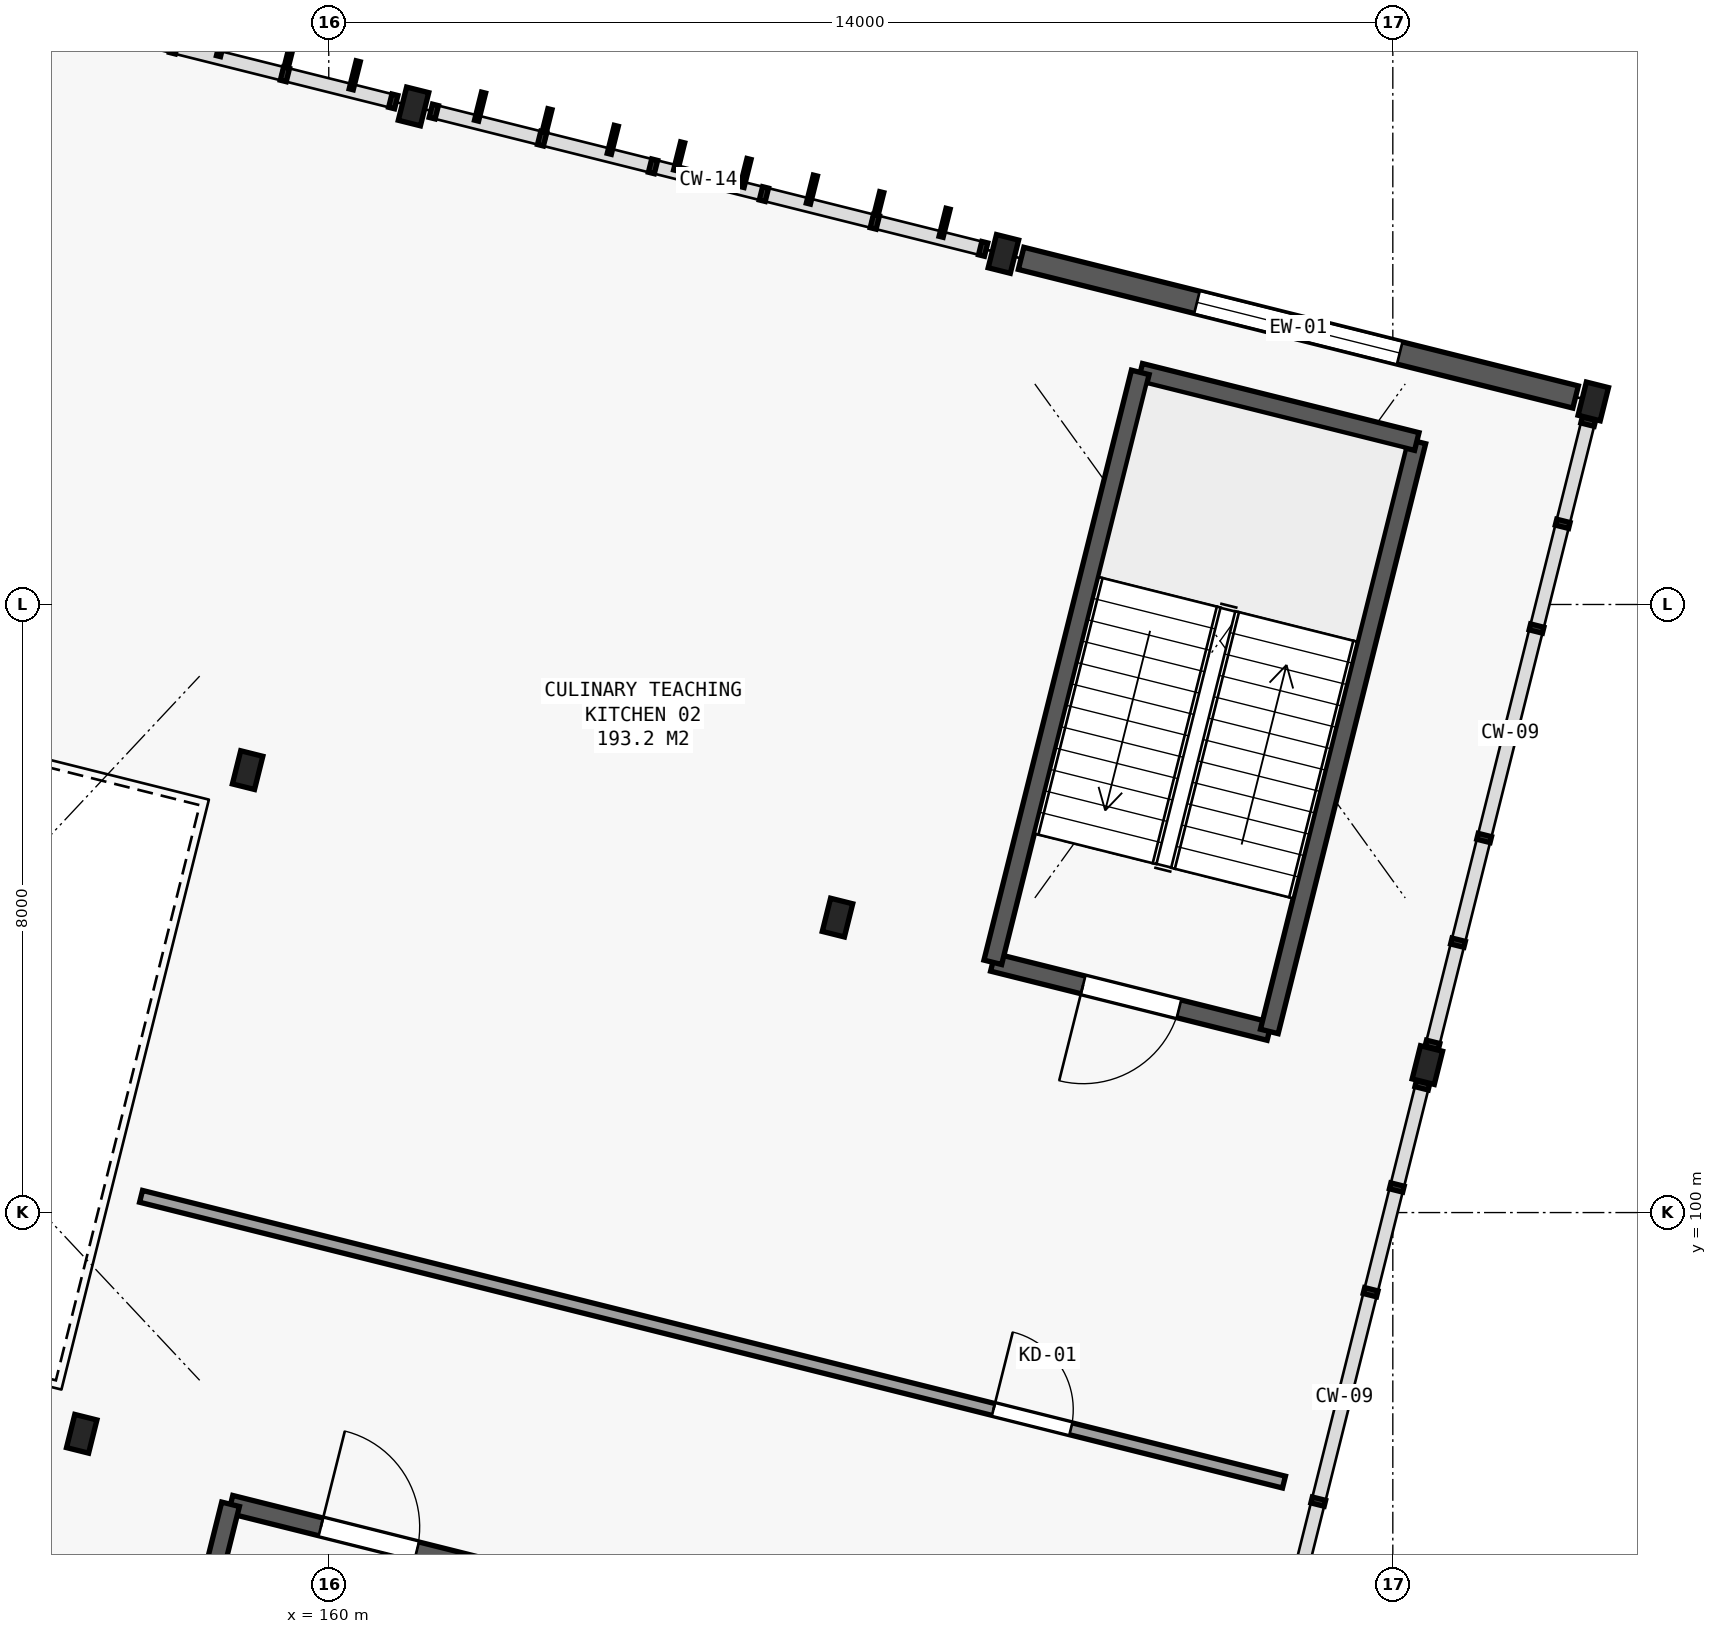
"""IFC4 building model, lengths in metres.
Left out: names, types, materials, properties, quantities, classifications, styles, units other than length and angle.
Written with IfcOpenShell. Run it as: python <this file> out.ifc"""

import sys

from ifc_helpers import new_model, si_unit, direction, frame, frame_2d, origin, origin_2d, place, context, subcontext, project, spatial, rectangle, i_section, extrude, element, fill, save


model = new_model("IFC4")
c1 = context("Model", 3, precision=1e-05, world=origin(), true_north=direction((0.0, 1.0)))
c2 = subcontext(c1, "Body", "Model", "MODEL_VIEW")
j1 = project(units=[si_unit("LENGTHUNIT", "METRE"), si_unit("PLANEANGLEUNIT", "RADIAN")], contexts=[c1])
p1 = place(None, origin())
s1 = spatial("IfcSite", under=j1, at=p1, CompositionType="ELEMENT")
p2 = place(p1, origin())
s2 = spatial("IfcBuilding", under=s1, at=p2, CompositionType="ELEMENT")
p3 = place(p2, frame((0.0, 0.0, 5.4)))
s3 = spatial("IfcBuildingStorey", under=s2, at=p3, CompositionType="ELEMENT", Elevation=5.4)
for number, where, z_axis, x_axis in (
    (1, (156.75, 97.09, 0.0), (0.0, 0.0, 1.0), (0.97, -0.243, 0.0)),
    (2, (158.932, 105.821, 0.0), (0.0, 0.0, 1.0), (0.97, -0.243, 0.0)),
    (3, (161.115, 114.552, 0.0), (0.0, 0.0, 1.0), (0.97, -0.243, 0.0)),
    (4, (166.694, 103.881, 0.0), (0.0, 0.0, 1.0), (0.97, -0.243, 0.0)),
    (5, (168.876, 112.612, 0.0), (0.0, 0.0, 1.0), (0.97, -0.243, 0.0)),
    (6, (174.455, 101.94, 0.0), (0.0, 0.0, 1.0), (0.97, -0.243, 0.0)),
    (7, (176.638, 110.672, 0.0), (0.0, 0.0, 1.0), (0.97, -0.243, 0.0)),
):
    element("IfcColumn", number, at=place(p3, frame(where, z_axis=z_axis, x_axis=x_axis)), inside=s3, PredefinedType="COLUMN", context=c2, shape_type="SweptSolid", body=[
        extrude(i_section(OverallWidth=0.3, OverallDepth=0.45, WebThickness=0.014, FlangeThickness=0.026, FilletRadius=0.027, at=origin_2d()), origin(), (0.0, 0.0, 1.0), 4.5),
    ])
p4 = place(p3, frame((169.109, 112.554, 0.0), z_axis=(0.0, 0.0, 1.0), x_axis=(0.970138680536, -0.242550902961, 0.0)))
e8 = element("IfcWall", 8, at=p4, inside=s3, PredefinedType="SHEAR", context=c2, shape_type="SweptSolid", body=[
    extrude(rectangle(XDim=7.52, YDim=0.3, at=frame_2d((3.76, 0.0))), origin(), (0.0, 0.0, 1.0), 4.22),
])
p5 = place(p4, frame((2.385, 0.0, 1.0)))
e9 = element("IfcOpeningElement", 9, at=p5, cuts=e8, PredefinedType="OPENING", context=c2, shape_type="SweptSolid", body=[
    extrude(rectangle(XDim=2.75, YDim=1.9, at=frame_2d((1.375, 0.95))), frame((0.0, 0.16, 0.0), z_axis=(0.0, -1.0, 0.0), x_axis=(1.0, 0.0, 0.0)), (0.0, 0.0, 1.0), 0.32),
])
p6 = place(p3, frame((158.708, 96.162, 0.0), z_axis=(0.0, 0.0, 1.0), x_axis=(0.970150158722, -0.242504988675, 0.0)))
e10 = element("IfcWall", 10, at=p6, inside=s3, PredefinedType="SOLIDWALL", context=c2, shape_type="SweptSolid", body=[
    extrude(rectangle(XDim=3.75, YDim=0.24, at=frame_2d((1.875, 0.0))), origin(), (0.0, 0.0, 1.0), 4.255),
])
p7 = place(p6, frame((1.225, 0.0, 0.0)))
e11 = element("IfcOpeningElement", 11, at=p7, cuts=e10, PredefinedType="OPENING", context=c2, shape_type="SweptSolid", body=[
    extrude(rectangle(XDim=1.3, YDim=2.15, at=frame_2d((0.65, 1.075))), frame((0.0, 0.13, 0.0), z_axis=(0.0, -1.0, 0.0), x_axis=(1.0, 0.0, 0.0)), (0.0, 0.0, 1.0), 0.26),
])
p8 = place(p3, frame((156.768, 88.401, 0.0), z_axis=(0.0, 0.0, 1.0), x_axis=(0.242521263911, 0.970146090314, 0.0)))
e12 = element("IfcWall", 12, at=p8, inside=s3, PredefinedType="SOLIDWALL", context=c2, shape_type="SweptSolid", body=[
    extrude(rectangle(XDim=8.0, YDim=0.24, at=frame_2d((4.0, 0.0))), origin(), (0.0, 0.0, 1.0), 4.255),
])
p9 = place(p3, frame((172.375, 102.383, 0.0), z_axis=(0.0, 0.0, 1.0), x_axis=(-0.970131009923, 0.242581581301, 0.0)))
e13 = element("IfcWall", 13, at=p9, inside=s3, PredefinedType="SOLIDWALL", context=c2, shape_type="SweptSolid", body=[
    extrude(rectangle(XDim=3.75, YDim=0.24, at=frame_2d((1.875, 0.0))), origin(), (0.0, 0.0, 1.0), 4.255),
])
p10 = place(p9, frame((1.225, 0.0, 0.0)))
e14 = element("IfcOpeningElement", 14, at=p10, cuts=e13, PredefinedType="OPENING", context=c2, shape_type="SweptSolid", body=[
    extrude(rectangle(XDim=1.3, YDim=2.15, at=frame_2d((0.65, 1.075))), frame((0.0, 0.13, 0.0), z_axis=(0.0, -1.0, 0.0), x_axis=(1.0, 0.0, 0.0)), (0.0, 0.0, 1.0), 0.26),
])
p11 = place(p3, frame((174.315, 110.144, 0.0), z_axis=(0.0, 0.0, 1.0), x_axis=(-0.242521263911, -0.970146090314, 0.0)))
e15 = element("IfcWall", 15, at=p11, inside=s3, PredefinedType="SOLIDWALL", context=c2, shape_type="SweptSolid", body=[
    extrude(rectangle(XDim=8.0, YDim=0.24, at=frame_2d((4.0, 0.0))), origin(), (0.0, 0.0, 1.0), 4.255),
])
p12 = place(p3, frame((170.677, 111.054, 0.0), z_axis=(0.0, 0.0, 1.0), x_axis=(0.970131009923, -0.242581581301, 0.0)))
e16 = element("IfcWall", 16, at=p12, inside=s3, PredefinedType="SOLIDWALL", context=c2, shape_type="SweptSolid", body=[
    extrude(rectangle(XDim=3.75, YDim=0.24, at=frame_2d((1.875, 0.0))), origin(), (0.0, 0.0, 1.0), 4.255),
])
p13 = place(p3, frame((168.737, 103.292, 0.0), z_axis=(0.0, 0.0, 1.0), x_axis=(0.242521263911, 0.970146090314, 0.0)))
e17 = element("IfcWall", 17, at=p13, inside=s3, PredefinedType="SOLIDWALL", context=c2, shape_type="SweptSolid", body=[
    extrude(rectangle(XDim=8.0, YDim=0.24, at=frame_2d((4.0, 0.0))), origin(), (0.0, 0.0, 1.0), 4.255),
])
p14 = place(p3, frame((157.531, 100.213, 0.0), z_axis=(0.0, 0.0, 1.0), x_axis=(0.97014342666, -0.242531918947, 0.0)))
e18 = element("IfcWall", 18, at=p14, inside=s3, PredefinedType="PARTITIONING", context=c2, shape_type="SweptSolid", body=[
    extrude(rectangle(XDim=15.5, YDim=0.16, at=frame_2d((7.75, 0.0))), origin(), (0.0, 0.0, 1.0), 3.64),
])
p15 = place(p14, frame((11.56, 0.0, 0.0)))
e19 = element("IfcOpeningElement", 19, at=p15, cuts=e18, PredefinedType="OPENING", context=c2, shape_type="SweptSolid", body=[
    extrude(rectangle(XDim=1.05, YDim=2.15, at=frame_2d((0.525, 1.075))), frame((0.0, 0.09, 0.0), z_axis=(0.0, -1.0, 0.0), x_axis=(1.0, 0.0, 0.0)), (0.0, 0.0, 1.0), 0.18),
])
p16 = place(p5, origin())
e20 = element("IfcWindow", 20, at=p16, inside=s3, PartitioningType="SINGLE_PANEL", PredefinedType="WINDOW", context=c2, shape_type="SweptSolid", body=[
    extrude(rectangle(XDim=2.75, YDim=1.9, at=frame_2d((1.375, 0.95))), frame((0.0, 0.03, 0.0), z_axis=(0.0, -1.0, 0.0), x_axis=(1.0, 0.0, 0.0)), (0.0, 0.0, 1.0), 0.06),
])
fill(e9, e20)
p17 = place(p7, origin())
e21 = element("IfcDoor", 21, at=p17, inside=s3, OperationType="SINGLE_SWING_LEFT", PredefinedType="DOOR", context=c2, shape_type="SweptSolid", body=[
    extrude(rectangle(XDim=1.3, YDim=2.15, at=frame_2d((0.65, 1.075))), frame((0.0, 0.025, 0.0), z_axis=(0.0, -1.0, 0.0), x_axis=(1.0, 0.0, 0.0)), (0.0, 0.0, 1.0), 0.05),
])
fill(e11, e21)
p18 = place(p10, origin())
e22 = element("IfcDoor", 22, at=p18, inside=s3, OperationType="SINGLE_SWING_RIGHT", PredefinedType="DOOR", context=c2, shape_type="SweptSolid", body=[
    extrude(rectangle(XDim=1.3, YDim=2.15, at=frame_2d((0.65, 1.075))), frame((0.0, 0.025, 0.0), z_axis=(0.0, -1.0, 0.0), x_axis=(1.0, 0.0, 0.0)), (0.0, 0.0, 1.0), 0.05),
])
fill(e14, e22)
p19 = place(p15, origin())
e23 = element("IfcDoor", 23, at=p19, inside=s3, OperationType="SINGLE_SWING_LEFT", PredefinedType="DOOR", context=c2, shape_type="SweptSolid", body=[
    extrude(rectangle(XDim=1.05, YDim=2.15, at=frame_2d((0.525, 1.075))), frame((0.0, 0.025, 0.0), z_axis=(0.0, -1.0, 0.0), x_axis=(1.0, 0.0, 0.0)), (0.0, 0.0, 1.0), 0.05),
])
fill(e19, e23)
save(model, sys.argv[1])
